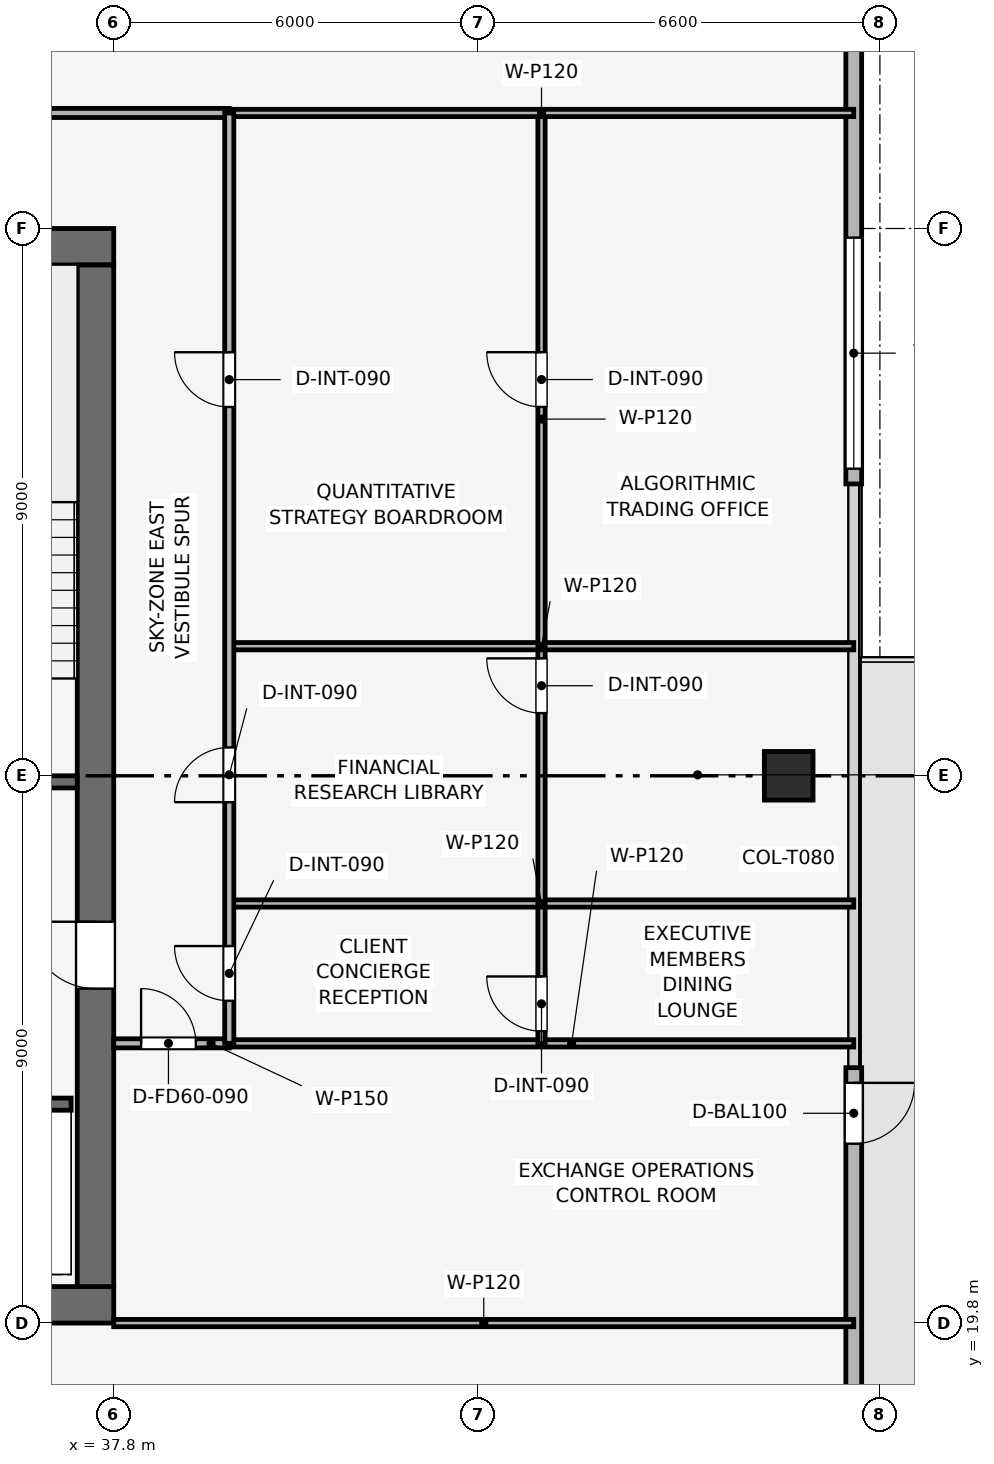
"""IFC4 building model, lengths in metres.
Left out: names, types, materials, properties, quantities, classifications, styles, units other than length and angle.
Written with IfcOpenShell. Run it as: python <this file> out.ifc"""

import sys

from ifc_helpers import new_model, si_unit, direction, frame, frame_2d, origin, origin_2d, place, context, subcontext, project, spatial, rectangle, extrude, element, fill, save


model = new_model("IFC4")
c1 = context("Model", 3, precision=1e-05, world=origin(), true_north=direction((0.0, 1.0)))
c2 = subcontext(c1, "Body", "Model", "MODEL_VIEW")
j1 = project(units=[si_unit("LENGTHUNIT", "METRE"), si_unit("PLANEANGLEUNIT", "RADIAN")], contexts=[c1])
p1 = place(None, origin())
s1 = spatial("IfcSite", under=j1, at=p1, CompositionType="ELEMENT")
p2 = place(p1, origin())
s2 = spatial("IfcBuilding", under=s1, at=p2, CompositionType="ELEMENT")
p3 = place(p2, frame((0.0, 0.0, 348.0)))
s3 = spatial("IfcBuildingStorey", under=s2, at=p3, CompositionType="ELEMENT", Elevation=348.0)
p4 = place(p3, frame((19.8, 20.1, 0.0), z_axis=(0.0, 0.0, 1.0), x_axis=(1.0, 0.0, 0.0)))
e1 = element("IfcWall", 1, at=p4, inside=s3, PredefinedType="SHEAR", context=c2, shape_type="SweptSolid", body=[
    extrude(rectangle(XDim=18.0, YDim=0.6, at=frame_2d((9.0, 0.0))), origin(), (0.0, 0.0, 1.0), 3.75),
])
p5 = place(p3, frame((19.8, 37.5, 0.0), z_axis=(0.0, 0.0, 1.0), x_axis=(1.0, 0.0, 0.0)))
e2 = element("IfcWall", 2, at=p5, inside=s3, PredefinedType="SHEAR", context=c2, shape_type="SweptSolid", body=[
    extrude(rectangle(XDim=18.0, YDim=0.6, at=frame_2d((9.0, 0.0))), origin(), (0.0, 0.0, 1.0), 3.75),
])
p6 = place(p5, frame((7.05, 0.0, 0.0)))
e3 = element("IfcOpeningElement", 3, at=p6, cuts=e2, PredefinedType="OPENING", context=c2, shape_type="SweptSolid", body=[
    extrude(rectangle(XDim=1.1, YDim=2.15, at=frame_2d((0.55, 1.075))), frame((0.0, 0.31, 0.0), z_axis=(0.0, -1.0, 0.0), x_axis=(1.0, 0.0, 0.0)), (0.0, 0.0, 1.0), 0.62),
])
p7 = place(p3, frame((37.5, 20.4, 0.0), z_axis=(0.0, 0.0, 1.0), x_axis=(0.0, 1.0, 0.0)))
e4 = element("IfcWall", 4, at=p7, inside=s3, PredefinedType="SHEAR", context=c2, shape_type="SweptSolid", body=[
    extrude(rectangle(XDim=16.8, YDim=0.6, at=frame_2d((8.4, 0.0))), origin(), (0.0, 0.0, 1.0), 3.75),
])
p8 = place(p7, frame((4.9, 0.0, 0.0)))
e5 = element("IfcOpeningElement", 5, at=p8, cuts=e4, PredefinedType="OPENING", context=c2, shape_type="SweptSolid", body=[
    extrude(rectangle(XDim=1.1, YDim=2.15, at=frame_2d((0.55, 1.075))), frame((0.0, 0.31, 0.0), z_axis=(0.0, -1.0, 0.0), x_axis=(1.0, 0.0, 0.0)), (0.0, 0.0, 1.0), 0.62),
])
p9 = place(p3, frame((48.9, 28.8, 0.003), z_axis=(0.0, 0.0, 1.0), x_axis=(1.0, 0.0, 0.0)))
e6 = element("IfcColumn", 6, at=p9, inside=s3, PredefinedType="COLUMN", context=c2, shape_type="SweptSolid", body=[
    extrude(rectangle(XDim=0.8, YDim=0.8, at=origin_2d()), origin(), (0.0, 0.0, 1.0), 3.504),
])
p10 = place(p3, frame((49.97, 44.3, 0.0), z_axis=(0.0, 0.0, 1.0), x_axis=(0.0, -1.0, 0.0)))
e7 = element("IfcWall", 7, at=p10, inside=s3, PredefinedType="SOLIDWALL", context=c2, shape_type="SweptSolid", body=[
    extrude(rectangle(XDim=10.7, YDim=0.26, at=frame_2d((5.35, 0.0))), origin(), (0.0, 0.0, 1.0), 3.51),
])
p11 = place(p10, frame((6.65, 0.0, 0.9)))
e8 = element("IfcOpeningElement", 8, at=p11, cuts=e7, PredefinedType="OPENING", context=c2, shape_type="SweptSolid", body=[
    extrude(rectangle(XDim=3.8, YDim=1.9, at=frame_2d((1.9, 0.95))), frame((0.0, 0.14, 0.0), z_axis=(0.0, -1.0, 0.0), x_axis=(1.0, 0.0, 0.0)), (0.0, 0.0, 1.0), 0.28),
])
p12 = place(p3, frame((49.97, 24.0, 0.0), z_axis=(0.0, 0.0, 1.0), x_axis=(0.0, -1.0, 0.0)))
e9 = element("IfcWall", 9, at=p12, inside=s3, PredefinedType="SOLIDWALL", context=c2, shape_type="SweptSolid", body=[
    extrude(rectangle(XDim=10.7, YDim=0.26, at=frame_2d((5.35, 0.0))), origin(), (0.0, 0.0, 1.0), 3.51),
])
p13 = place(p12, frame((0.25, 0.0, 0.0)))
e10 = element("IfcOpeningElement", 10, at=p13, cuts=e9, PredefinedType="OPENING", context=c2, shape_type="SweptSolid", body=[
    extrude(rectangle(XDim=1.0, YDim=2.2, at=frame_2d((0.5, 1.1))), frame((0.0, 0.14, 0.0), z_axis=(0.0, -1.0, 0.0), x_axis=(1.0, 0.0, 0.0)), (0.0, 0.0, 1.0), 0.28),
])
p14 = place(p3, frame((34.05, 28.7, 0.0), z_axis=(0.0, 0.0, 1.0), x_axis=(1.0, 0.0, 0.0)))
e11 = element("IfcWall", 11, at=p14, inside=s3, PredefinedType="SHEAR", context=c2, shape_type="SweptSolid", body=[
    extrude(rectangle(XDim=3.15, YDim=0.2, at=frame_2d((1.575, 0.0))), origin(), (0.0, 0.0, 1.0), 3.51),
])
p15 = place(p14, frame((0.8, 0.0, 0.0)))
e12 = element("IfcOpeningElement", 12, at=p15, cuts=e11, PredefinedType="OPENING", context=c2, shape_type="SweptSolid", body=[
    extrude(rectangle(XDim=1.0, YDim=2.1, at=frame_2d((0.5, 1.05))), frame((0.0, 0.11, 0.0), z_axis=(0.0, -1.0, 0.0), x_axis=(1.0, 0.0, 0.0)), (0.0, 0.0, 1.0), 0.22),
])
p16 = place(p3, frame((34.05, 23.4, 0.0), z_axis=(0.0, 0.0, 1.0), x_axis=(1.0, 0.0, 0.0)))
e13 = element("IfcWall", 13, at=p16, inside=s3, PredefinedType="SHEAR", context=c2, shape_type="SweptSolid", body=[
    extrude(rectangle(XDim=3.05, YDim=0.2, at=frame_2d((1.525, 0.0))), origin(), (0.0, 0.0, 1.0), 3.51),
])
p17 = place(p16, frame((1.2, 0.0, 0.0)))
e14 = element("IfcOpeningElement", 14, at=p17, cuts=e13, PredefinedType="OPENING", context=c2, shape_type="SweptSolid", body=[
    extrude(rectangle(XDim=1.1, YDim=2.15, at=frame_2d((0.55, 1.075))), frame((0.0, 0.11, 0.0), z_axis=(0.0, -1.0, 0.0), x_axis=(1.0, 0.0, 0.0)), (0.0, 0.0, 1.0), 0.22),
])
p18 = place(p3, frame((37.8, 19.8, 0.0), z_axis=(0.0, 0.0, 1.0), x_axis=(1.0, 0.0, 0.0)))
e15 = element("IfcWall", 15, at=p18, inside=s3, PredefinedType="PARTITIONING", context=c2, shape_type="SweptSolid", body=[
    extrude(rectangle(XDim=12.17, YDim=0.12, at=frame_2d((6.085, 0.0))), origin(), (0.0, 0.0, 1.0), 3.095),
])
p19 = place(p3, frame((37.8, 24.4, 0.0), z_axis=(0.0, 0.0, 1.0), x_axis=(1.0, 0.0, 0.0)))
e16 = element("IfcWall", 16, at=p19, inside=s3, PredefinedType="PARTITIONING", context=c2, shape_type="SweptSolid", body=[
    extrude(rectangle(XDim=1.9, YDim=0.15, at=frame_2d((0.95, 0.0))), origin(), (0.0, 0.0, 1.0), 3.51),
])
p20 = place(p19, frame((0.45, 0.0, 0.0)))
e17 = element("IfcOpeningElement", 17, at=p20, cuts=e16, PredefinedType="OPENING", context=c2, shape_type="SweptSolid", body=[
    extrude(rectangle(XDim=0.9, YDim=2.1, at=frame_2d((0.45, 1.05))), frame((0.0, 0.085, 0.0), z_axis=(0.0, -1.0, 0.0), x_axis=(1.0, 0.0, 0.0)), (0.0, 0.0, 1.0), 0.17),
])
p21 = place(p3, frame((39.7, 24.4, 0.0), z_axis=(0.0, 0.0, 1.0), x_axis=(1.0, 0.0, 0.0)))
e18 = element("IfcWall", 18, at=p21, inside=s3, PredefinedType="PARTITIONING", context=c2, shape_type="SweptSolid", body=[
    extrude(rectangle(XDim=10.27, YDim=0.12, at=frame_2d((5.135, 0.0))), origin(), (0.0, 0.0, 1.0), 3.135),
])
p22 = place(p3, frame((44.835, 24.4, 0.0), z_axis=(0.0, 0.0, 1.0), x_axis=(0.0, 1.0, 0.0)))
e19 = element("IfcWall", 19, at=p22, inside=s3, PredefinedType="PARTITIONING", context=c2, shape_type="SweptSolid", body=[
    extrude(rectangle(XDim=2.3, YDim=0.12, at=frame_2d((1.15, 0.0))), origin(), (0.0, 0.0, 1.0), 3.51),
])
p23 = place(p22, frame((0.2, 0.0, 0.0)))
e20 = element("IfcOpeningElement", 20, at=p23, cuts=e19, PredefinedType="OPENING", context=c2, shape_type="SweptSolid", body=[
    extrude(rectangle(XDim=0.9, YDim=2.1, at=frame_2d((0.45, 1.05))), frame((0.0, 0.07, 0.0), z_axis=(0.0, -1.0, 0.0), x_axis=(1.0, 0.0, 0.0)), (0.0, 0.0, 1.0), 0.14),
])
p24 = place(p3, frame((39.7, 26.7, 0.0), z_axis=(0.0, 0.0, 1.0), x_axis=(1.0, 0.0, 0.0)))
e21 = element("IfcWall", 21, at=p24, inside=s3, PredefinedType="PARTITIONING", context=c2, shape_type="SweptSolid", body=[
    extrude(rectangle(XDim=10.27, YDim=0.12, at=frame_2d((5.135, 0.0))), origin(), (0.0, 0.0, 1.0), 3.135),
])
p25 = place(p3, frame((44.835, 26.7, 0.0), z_axis=(0.0, 0.0, 1.0), x_axis=(0.0, 1.0, 0.0)))
e22 = element("IfcWall", 22, at=p25, inside=s3, PredefinedType="PARTITIONING", context=c2, shape_type="SweptSolid", body=[
    extrude(rectangle(XDim=4.231, YDim=0.12, at=frame_2d((2.115, 0.0))), origin(), (0.0, 0.0, 1.0), 3.095),
])
p26 = place(p25, frame((3.131, 0.0, 0.0)))
e23 = element("IfcOpeningElement", 23, at=p26, cuts=e22, PredefinedType="OPENING", context=c2, shape_type="SweptSolid", body=[
    extrude(rectangle(XDim=0.9, YDim=2.1, at=frame_2d((0.45, 1.05))), frame((0.0, 0.07, 0.0), z_axis=(0.0, -1.0, 0.0), x_axis=(1.0, 0.0, 0.0)), (0.0, 0.0, 1.0), 0.14),
])
p27 = place(p3, frame((39.7, 30.931, 0.0), z_axis=(0.0, 0.0, 1.0), x_axis=(1.0, 0.0, 0.0)))
e24 = element("IfcWall", 24, at=p27, inside=s3, PredefinedType="PARTITIONING", context=c2, shape_type="SweptSolid", body=[
    extrude(rectangle(XDim=10.27, YDim=0.12, at=frame_2d((5.135, 0.0))), origin(), (0.0, 0.0, 1.0), 3.135),
])
p28 = place(p3, frame((44.835, 30.931, 0.0), z_axis=(0.0, 0.0, 1.0), x_axis=(0.0, 1.0, 0.0)))
e25 = element("IfcWall", 25, at=p28, inside=s3, PredefinedType="PARTITIONING", context=c2, shape_type="SweptSolid", body=[
    extrude(rectangle(XDim=8.769, YDim=0.12, at=frame_2d((4.385, 0.0))), origin(), (0.0, 0.0, 1.0), 3.095),
])
p29 = place(p28, frame((3.935, 0.0, 0.0)))
e26 = element("IfcOpeningElement", 26, at=p29, cuts=e25, PredefinedType="OPENING", context=c2, shape_type="SweptSolid", body=[
    extrude(rectangle(XDim=0.9, YDim=2.1, at=frame_2d((0.45, 1.05))), frame((0.0, 0.07, 0.0), z_axis=(0.0, -1.0, 0.0), x_axis=(1.0, 0.0, 0.0)), (0.0, 0.0, 1.0), 0.14),
])
p30 = place(p3, frame((39.7, 39.7, 0.0), z_axis=(0.0, 0.0, 1.0), x_axis=(1.0, 0.0, 0.0)))
e27 = element("IfcWall", 27, at=p30, inside=s3, PredefinedType="PARTITIONING", context=c2, shape_type="SweptSolid", body=[
    extrude(rectangle(XDim=10.27, YDim=0.12, at=frame_2d((5.135, 0.0))), origin(), (0.0, 0.0, 1.0), 3.095),
])
p31 = place(p3, frame((17.9, 39.7, 0.0), z_axis=(0.0, 0.0, 1.0), x_axis=(1.0, 0.0, 0.0)))
e28 = element("IfcWall", 28, at=p31, inside=s3, PredefinedType="PARTITIONING", context=c2, shape_type="SweptSolid", body=[
    extrude(rectangle(XDim=21.8, YDim=0.15, at=frame_2d((10.9, 0.0))), origin(), (0.0, 0.0, 1.0), 3.095),
])
p32 = place(p31, frame((5.516, 0.0, 0.0)))
e29 = element("IfcOpeningElement", 29, at=p32, cuts=e28, PredefinedType="OPENING", context=c2, shape_type="SweptSolid", body=[
    extrude(rectangle(XDim=0.9, YDim=2.1, at=frame_2d((0.45, 1.05))), frame((0.0, 0.085, 0.0), z_axis=(0.0, -1.0, 0.0), x_axis=(1.0, 0.0, 0.0)), (0.0, 0.0, 1.0), 0.17),
])
p33 = place(p31, frame((16.416, 0.0, 0.0)))
e30 = element("IfcOpeningElement", 30, at=p33, cuts=e28, PredefinedType="OPENING", context=c2, shape_type="SweptSolid", body=[
    extrude(rectangle(XDim=0.9, YDim=2.1, at=frame_2d((0.45, 1.05))), frame((0.0, 0.085, 0.0), z_axis=(0.0, -1.0, 0.0), x_axis=(1.0, 0.0, 0.0)), (0.0, 0.0, 1.0), 0.17),
])
p34 = place(p3, frame((39.7, 24.4, 0.0), z_axis=(0.0, 0.0, 1.0), x_axis=(0.0, 1.0, 0.0)))
e31 = element("IfcWall", 31, at=p34, inside=s3, PredefinedType="PARTITIONING", context=c2, shape_type="SweptSolid", body=[
    extrude(rectangle(XDim=15.3, YDim=0.15, at=frame_2d((7.65, 0.0))), origin(), (0.0, 0.0, 1.0), 3.095),
])
p35 = place(p34, frame((0.7, 0.0, 0.0)))
e32 = element("IfcOpeningElement", 32, at=p35, cuts=e31, PredefinedType="OPENING", context=c2, shape_type="SweptSolid", body=[
    extrude(rectangle(XDim=0.9, YDim=2.1, at=frame_2d((0.45, 1.05))), frame((0.0, 0.085, 0.0), z_axis=(0.0, -1.0, 0.0), x_axis=(1.0, 0.0, 0.0)), (0.0, 0.0, 1.0), 0.17),
])
p36 = place(p34, frame((3.966, 0.0, 0.0)))
e33 = element("IfcOpeningElement", 33, at=p36, cuts=e31, PredefinedType="OPENING", context=c2, shape_type="SweptSolid", body=[
    extrude(rectangle(XDim=0.9, YDim=2.1, at=frame_2d((0.45, 1.05))), frame((0.0, 0.085, 0.0), z_axis=(0.0, -1.0, 0.0), x_axis=(1.0, 0.0, 0.0)), (0.0, 0.0, 1.0), 0.17),
])
p37 = place(p34, frame((10.465, 0.0, 0.0)))
e34 = element("IfcOpeningElement", 34, at=p37, cuts=e31, PredefinedType="OPENING", context=c2, shape_type="SweptSolid", body=[
    extrude(rectangle(XDim=0.9, YDim=2.1, at=frame_2d((0.45, 1.05))), frame((0.0, 0.085, 0.0), z_axis=(0.0, -1.0, 0.0), x_axis=(1.0, 0.0, 0.0)), (0.0, 0.0, 1.0), 0.17),
])
p38 = place(p13, origin())
e35 = element("IfcDoor", 35, at=p38, inside=s3, OperationType="SINGLE_SWING_LEFT", PredefinedType="DOOR", context=c2, shape_type="SweptSolid", body=[
    extrude(rectangle(XDim=1.0, YDim=2.2, at=frame_2d((0.5, 1.1))), frame((0.0, 0.025, 0.0), z_axis=(0.0, -1.0, 0.0), x_axis=(1.0, 0.0, 0.0)), (0.0, 0.0, 1.0), 0.05),
])
fill(e10, e35)
p39 = place(p11, origin())
e36 = element("IfcWindow", 36, at=p39, inside=s3, PartitioningType="SINGLE_PANEL", PredefinedType="WINDOW", context=c2, shape_type="SweptSolid", body=[
    extrude(rectangle(XDim=3.8, YDim=1.9, at=frame_2d((1.9, 0.95))), frame((0.0, 0.03, 0.0), z_axis=(0.0, -1.0, 0.0), x_axis=(1.0, 0.0, 0.0)), (0.0, 0.0, 1.0), 0.06),
])
fill(e8, e36)
p40 = place(p20, origin())
e37 = element("IfcDoor", 37, at=p40, inside=s3, OperationType="SINGLE_SWING_LEFT", PredefinedType="DOOR", context=c2, shape_type="SweptSolid", body=[
    extrude(rectangle(XDim=0.9, YDim=2.1, at=frame_2d((0.45, 1.05))), frame((0.0, 0.025, 0.0), z_axis=(0.0, -1.0, 0.0), x_axis=(1.0, 0.0, 0.0)), (0.0, 0.0, 1.0), 0.05),
])
fill(e17, e37)
p41 = place(p23, origin())
e38 = element("IfcDoor", 38, at=p41, inside=s3, OperationType="SINGLE_SWING_RIGHT", PredefinedType="DOOR", context=c2, shape_type="SweptSolid", body=[
    extrude(rectangle(XDim=0.9, YDim=2.1, at=frame_2d((0.45, 1.05))), frame((0.0, 0.025, 0.0), z_axis=(0.0, -1.0, 0.0), x_axis=(1.0, 0.0, 0.0)), (0.0, 0.0, 1.0), 0.05),
])
fill(e20, e38)
p42 = place(p26, origin())
e39 = element("IfcDoor", 39, at=p42, inside=s3, OperationType="SINGLE_SWING_RIGHT", PredefinedType="DOOR", context=c2, shape_type="SweptSolid", body=[
    extrude(rectangle(XDim=0.9, YDim=2.1, at=frame_2d((0.45, 1.05))), frame((0.0, 0.025, 0.0), z_axis=(0.0, -1.0, 0.0), x_axis=(1.0, 0.0, 0.0)), (0.0, 0.0, 1.0), 0.05),
])
fill(e23, e39)
p43 = place(p29, origin())
e40 = element("IfcDoor", 40, at=p43, inside=s3, OperationType="SINGLE_SWING_RIGHT", PredefinedType="DOOR", context=c2, shape_type="SweptSolid", body=[
    extrude(rectangle(XDim=0.9, YDim=2.1, at=frame_2d((0.45, 1.05))), frame((0.0, 0.025, 0.0), z_axis=(0.0, -1.0, 0.0), x_axis=(1.0, 0.0, 0.0)), (0.0, 0.0, 1.0), 0.05),
])
fill(e26, e40)
p44 = place(p35, origin())
e41 = element("IfcDoor", 41, at=p44, inside=s3, OperationType="SINGLE_SWING_RIGHT", PredefinedType="DOOR", context=c2, shape_type="SweptSolid", body=[
    extrude(rectangle(XDim=0.9, YDim=2.1, at=frame_2d((0.45, 1.05))), frame((0.0, 0.025, 0.0), z_axis=(0.0, -1.0, 0.0), x_axis=(1.0, 0.0, 0.0)), (0.0, 0.0, 1.0), 0.05),
])
fill(e32, e41)
p45 = place(p36, origin())
e42 = element("IfcDoor", 42, at=p45, inside=s3, OperationType="SINGLE_SWING_LEFT", PredefinedType="DOOR", context=c2, shape_type="SweptSolid", body=[
    extrude(rectangle(XDim=0.9, YDim=2.1, at=frame_2d((0.45, 1.05))), frame((0.0, 0.025, 0.0), z_axis=(0.0, -1.0, 0.0), x_axis=(1.0, 0.0, 0.0)), (0.0, 0.0, 1.0), 0.05),
])
fill(e33, e42)
p46 = place(p37, origin())
e43 = element("IfcDoor", 43, at=p46, inside=s3, OperationType="SINGLE_SWING_RIGHT", PredefinedType="DOOR", context=c2, shape_type="SweptSolid", body=[
    extrude(rectangle(XDim=0.9, YDim=2.1, at=frame_2d((0.45, 1.05))), frame((0.0, 0.025, 0.0), z_axis=(0.0, -1.0, 0.0), x_axis=(1.0, 0.0, 0.0)), (0.0, 0.0, 1.0), 0.05),
])
fill(e34, e43)
p47 = place(p8, origin())
e44 = element("IfcDoor", 44, at=p47, inside=s3, OperationType="SINGLE_SWING_RIGHT", PredefinedType="DOOR", context=c2, shape_type="SweptSolid", body=[
    extrude(rectangle(XDim=1.1, YDim=2.15, at=frame_2d((0.55, 1.075))), frame((0.0, 0.025, 0.0), z_axis=(0.0, -1.0, 0.0), x_axis=(1.0, 0.0, 0.0)), (0.0, 0.0, 1.0), 0.05),
])
fill(e5, e44)
save(model, sys.argv[1])
